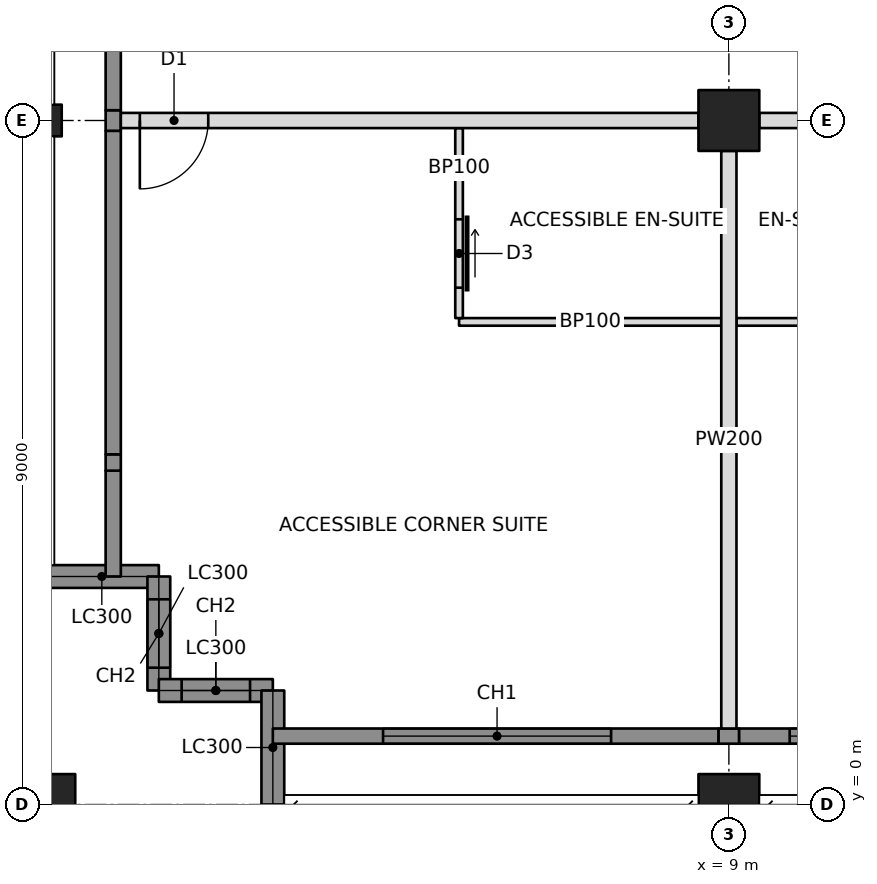
"""IFC4 building model, lengths in metres.
Left out: names, types, materials, properties, quantities, classifications, styles, units other than length and angle.
Written with IfcOpenShell. Run it as: python <this file> out.ifc"""

import sys

from ifc_helpers import new_model, si_unit, direction, frame, frame_2d, origin, origin_with_axes, origin_2d, place, context, subcontext, project, spatial, rectangle, hollow_rectangle, i_section, extrude, element, fill, save


model = new_model("IFC4")
c1 = context("Model", 3, precision=1e-05, world=origin(), true_north=direction((0.0, 1.0)))
c2 = subcontext(c1, "Body", "Model", "MODEL_VIEW")
j1 = project(units=[si_unit("LENGTHUNIT", "METRE"), si_unit("PLANEANGLEUNIT", "RADIAN")], contexts=[c1])
p1 = place(None, origin())
s1 = spatial("IfcSite", under=j1, at=p1, CompositionType="ELEMENT")
p2 = place(p1, origin())
s2 = spatial("IfcBuilding", under=s1, at=p2, CompositionType="ELEMENT")
p3 = place(p2, frame((0.0, 0.0, 259.0)))
s3 = spatial("IfcBuildingStorey", under=s2, at=p3, CompositionType="ELEMENT", Elevation=259.0)
p4 = place(p3, origin_with_axes())
e1 = element("IfcColumn", 1, at=p4, inside=s3, PredefinedType="COLUMN", context=c2, shape_type="SweptSolid", body=[
    extrude(hollow_rectangle(XDim=0.8, YDim=0.8, WallThickness=0.032, at=origin_2d()), origin(), (0.0, 0.0, 1.0), 3.6),
])
p5 = place(p3, frame((0.0, 9.0, 0.0), z_axis=(0.0, 0.0, 1.0), x_axis=(0.0, 1.0, 0.0)))
e2 = element("IfcColumn", 2, at=p5, inside=s3, PredefinedType="COLUMN", context=c2, shape_type="SweptSolid", body=[
    extrude(i_section(OverallWidth=0.417, OverallDepth=0.445, WebThickness=0.039, FlangeThickness=0.063, at=origin_2d()), origin(), (0.0, 0.0, 1.0), 3.6),
])
for number, where, z_axis, x_axis in (
    (3, (9.0, 0.0, 0.0), (0.0, 0.0, 1.0), (1.0, 0.0, 0.0)),
    (4, (9.0, 9.0, 0.0), (0.0, 0.0, 1.0), (1.0, 0.0, 0.0)),
):
    element("IfcColumn", number, at=place(p3, frame(where, z_axis=z_axis, x_axis=x_axis)), inside=s3, PredefinedType="COLUMN", context=c2, shape_type="SweptSolid", body=[
        extrude(hollow_rectangle(XDim=0.8, YDim=0.8, WallThickness=0.032, at=origin_2d()), origin(), (0.0, 0.0, 1.0), 3.6),
    ])
p6 = place(p3, frame((0.0, 3.0, 0.0), z_axis=(0.0, 0.0, 1.0), x_axis=(1.0, 0.0, 0.0)))
e5 = element("IfcWall", 5, at=p6, inside=s3, PredefinedType="SOLIDWALL", context=c2, shape_type="SweptSolid", body=[
    extrude(rectangle(XDim=1.5, YDim=0.3, at=frame_2d((0.75, 0.0))), origin(), (0.0, 0.0, 1.0), 2.62),
])
p7 = place(p3, frame((1.5, 3.0, 0.0), z_axis=(0.0, 0.0, 1.0), x_axis=(0.0, -1.0, 0.0)))
e6 = element("IfcWall", 6, at=p7, inside=s3, PredefinedType="SOLIDWALL", context=c2, shape_type="SweptSolid", body=[
    extrude(rectangle(XDim=1.5, YDim=0.3, at=frame_2d((0.75, 0.0))), origin(), (0.0, 0.0, 1.0), 3.4),
])
p8 = place(p7, frame((0.3, 0.0, 0.6)))
e7 = element("IfcOpeningElement", 7, at=p8, cuts=e6, PredefinedType="OPENING", context=c2, shape_type="SweptSolid", body=[
    extrude(rectangle(XDim=0.9, YDim=2.2, at=frame_2d((0.45, 1.1))), frame((0.0, 0.16, 0.0), z_axis=(0.0, -1.0, 0.0), x_axis=(1.0, 0.0, 0.0)), (0.0, 0.0, 1.0), 0.32),
])
p9 = place(p3, frame((1.5, 1.5, 0.0), z_axis=(0.0, 0.0, 1.0), x_axis=(1.0, 0.0, 0.0)))
e8 = element("IfcWall", 8, at=p9, inside=s3, PredefinedType="SOLIDWALL", context=c2, shape_type="SweptSolid", body=[
    extrude(rectangle(XDim=1.5, YDim=0.3, at=frame_2d((0.75, 0.0))), origin(), (0.0, 0.0, 1.0), 3.4),
])
p10 = place(p9, frame((0.3, 0.0, 0.6)))
e9 = element("IfcOpeningElement", 9, at=p10, cuts=e8, PredefinedType="OPENING", context=c2, shape_type="SweptSolid", body=[
    extrude(rectangle(XDim=0.9, YDim=2.2, at=frame_2d((0.45, 1.1))), frame((0.0, 0.16, 0.0), z_axis=(0.0, -1.0, 0.0), x_axis=(1.0, 0.0, 0.0)), (0.0, 0.0, 1.0), 0.32),
])
p11 = place(p3, frame((3.0, 1.5, 0.0), z_axis=(0.0, 0.0, 1.0), x_axis=(0.0, -1.0, 0.0)))
e10 = element("IfcWall", 10, at=p11, inside=s3, PredefinedType="SOLIDWALL", context=c2, shape_type="SweptSolid", body=[
    extrude(rectangle(XDim=1.5, YDim=0.3, at=frame_2d((0.75, 0.0))), origin(), (0.0, 0.0, 1.0), 2.62),
])
p12 = place(p3, frame((3.0, 0.9, 0.0), z_axis=(0.0, 0.0, 1.0), x_axis=(1.0, 0.0, 0.0)))
e11 = element("IfcWall", 11, at=p12, inside=s3, PredefinedType="SOLIDWALL", context=c2, shape_type="SweptSolid", body=[
    extrude(rectangle(XDim=5.865, YDim=0.2, at=frame_2d((2.932, 0.0))), origin(), (0.0, 0.0, 1.0), 3.4),
])
p13 = place(p12, frame((1.45, 0.0, 0.6)))
e12 = element("IfcOpeningElement", 12, at=p13, cuts=e11, PredefinedType="OPENING", context=c2, shape_type="SweptSolid", body=[
    extrude(rectangle(XDim=3.0, YDim=2.2, at=frame_2d((1.5, 1.1))), frame((0.0, 0.11, 0.0), z_axis=(0.0, -1.0, 0.0), x_axis=(1.0, 0.0, 0.0)), (0.0, 0.0, 1.0), 0.22),
])
p14 = place(p3, frame((0.9, 3.0, 0.0), z_axis=(0.0, 0.0, 1.0), x_axis=(0.0, 1.0, 0.0)))
e13 = element("IfcWall", 13, at=p14, inside=s3, PredefinedType="SOLIDWALL", context=c2, shape_type="SweptSolid", body=[
    extrude(rectangle(XDim=1.393, YDim=0.2, at=frame_2d((0.696, 0.0))), origin(), (0.0, 0.0, 1.0), 3.4),
])
p15 = place(p3, frame((1.0, 9.0, 0.0), z_axis=(0.0, 0.0, 1.0), x_axis=(1.0, 0.0, 0.0)))
e14 = element("IfcWall", 14, at=p15, inside=s3, PredefinedType="PARTITIONING", context=c2, shape_type="SweptSolid", body=[
    extrude(rectangle(XDim=7.6, YDim=0.2, at=frame_2d((3.8, 0.0))), origin(), (0.0, 0.0, 1.0), 2.638),
])
p16 = place(p15, frame((0.25, 0.0, 0.0)))
e15 = element("IfcOpeningElement", 15, at=p16, cuts=e14, PredefinedType="OPENING", context=c2, shape_type="SweptSolid", body=[
    extrude(rectangle(XDim=0.9, YDim=2.1, at=frame_2d((0.45, 1.05))), frame((0.0, 0.11, 0.0), z_axis=(0.0, -1.0, 0.0), x_axis=(1.0, 0.0, 0.0)), (0.0, 0.0, 1.0), 0.22),
])
p17 = place(p3, frame((9.4, 9.0, 0.0), z_axis=(0.0, 0.0, 1.0), x_axis=(1.0, 0.0, 0.0)))
e16 = element("IfcWall", 16, at=p17, inside=s3, PredefinedType="PARTITIONING", context=c2, shape_type="SweptSolid", body=[
    extrude(rectangle(XDim=8.2, YDim=0.2, at=frame_2d((4.1, 0.0))), origin(), (0.0, 0.0, 1.0), 2.605),
])
p18 = place(p17, frame((2.95, 0.0, 0.0)))
e17 = element("IfcOpeningElement", 17, at=p18, cuts=e16, PredefinedType="OPENING", context=c2, shape_type="SweptSolid", body=[
    extrude(rectangle(XDim=0.9, YDim=2.1, at=frame_2d((0.45, 1.05))), frame((0.0, 0.11, 0.0), z_axis=(0.0, -1.0, 0.0), x_axis=(1.0, 0.0, 0.0)), (0.0, 0.0, 1.0), 0.22),
])
p19 = place(p17, frame((4.35, 0.0, 0.0)))
e18 = element("IfcOpeningElement", 18, at=p19, cuts=e16, PredefinedType="OPENING", context=c2, shape_type="SweptSolid", body=[
    extrude(rectangle(XDim=0.9, YDim=2.1, at=frame_2d((0.45, 1.05))), frame((0.0, 0.11, 0.0), z_axis=(0.0, -1.0, 0.0), x_axis=(1.0, 0.0, 0.0)), (0.0, 0.0, 1.0), 0.22),
])
p20 = place(p3, frame((9.0, 8.6, 0.0), z_axis=(0.0, 0.0, 1.0), x_axis=(0.0, -1.0, 0.0)))
e19 = element("IfcWall", 19, at=p20, inside=s3, PredefinedType="PARTITIONING", context=c2, shape_type="SweptSolid", body=[
    extrude(rectangle(XDim=7.6, YDim=0.2, at=frame_2d((3.8, 0.0))), origin(), (0.0, 0.0, 1.0), 2.638),
])
p21 = place(p3, frame((5.45, 6.35, 0.0), z_axis=(0.0, 0.0, 1.0), x_axis=(1.0, 0.0, 0.0)))
e20 = element("IfcWall", 20, at=p21, inside=s3, PredefinedType="PARTITIONING", context=c2, shape_type="SweptSolid", body=[
    extrude(rectangle(XDim=3.45, YDim=0.1, at=frame_2d((1.725, 0.0))), origin(), (0.0, 0.0, 1.0), 2.638),
])
p22 = place(p3, frame((5.45, 8.9, 0.0), z_axis=(0.0, 0.0, 1.0), x_axis=(0.0, -1.0, 0.0)))
e21 = element("IfcWall", 21, at=p22, inside=s3, PredefinedType="PARTITIONING", context=c2, shape_type="SweptSolid", body=[
    extrude(rectangle(XDim=2.5, YDim=0.1, at=frame_2d((1.25, 0.0))), origin(), (0.0, 0.0, 1.0), 2.638),
])
p23 = place(p22, frame((1.2, 0.0, 0.0)))
e22 = element("IfcOpeningElement", 22, at=p23, cuts=e21, PredefinedType="OPENING", context=c2, shape_type="SweptSolid", body=[
    extrude(rectangle(XDim=0.9, YDim=2.1, at=frame_2d((0.45, 1.05))), frame((0.0, 0.06, 0.0), z_axis=(0.0, -1.0, 0.0), x_axis=(1.0, 0.0, 0.0)), (0.0, 0.0, 1.0), 0.12),
])
p24 = place(p3, frame((9.1, 6.35, 0.0), z_axis=(0.0, 0.0, 1.0), x_axis=(1.0, 0.0, 0.0)))
e23 = element("IfcWall", 23, at=p24, inside=s3, PredefinedType="PARTITIONING", context=c2, shape_type="SweptSolid", body=[
    extrude(rectangle(XDim=2.95, YDim=0.1, at=frame_2d((1.475, 0.0))), origin(), (0.0, 0.0, 1.0), 2.638),
])
p25 = place(p3, frame((8.865, 0.9, 0.0), z_axis=(0.0, 0.0, 1.0), x_axis=(1.0, 0.0, 0.0)))
e24 = element("IfcWall", 24, at=p25, inside=s3, PredefinedType="SOLIDWALL", context=c2, shape_type="SweptSolid", body=[
    extrude(rectangle(XDim=0.271, YDim=0.2, at=frame_2d((0.135, 0.0))), origin(), (0.0, 0.0, 1.0), 2.638),
])
p26 = place(p3, frame((9.135, 0.9, 0.0), z_axis=(0.0, 0.0, 1.0), x_axis=(1.0, 0.0, 0.0)))
e25 = element("IfcWall", 25, at=p26, inside=s3, PredefinedType="SOLIDWALL", context=c2, shape_type="SweptSolid", body=[
    extrude(rectangle(XDim=8.671, YDim=0.2, at=frame_2d((4.335, 0.0))), origin(), (0.0, 0.0, 1.0), 3.4),
])
p27 = place(p26, frame((0.665, 0.0, 0.6)))
e26 = element("IfcOpeningElement", 26, at=p27, cuts=e25, PredefinedType="OPENING", context=c2, shape_type="SweptSolid", body=[
    extrude(rectangle(XDim=3.0, YDim=2.2, at=frame_2d((1.5, 1.1))), frame((0.0, 0.11, 0.0), z_axis=(0.0, -1.0, 0.0), x_axis=(1.0, 0.0, 0.0)), (0.0, 0.0, 1.0), 0.22),
])
p28 = place(p26, frame((5.065, 0.0, 0.6)))
e27 = element("IfcOpeningElement", 27, at=p28, cuts=e25, PredefinedType="OPENING", context=c2, shape_type="SweptSolid", body=[
    extrude(rectangle(XDim=3.0, YDim=2.2, at=frame_2d((1.5, 1.1))), frame((0.0, 0.11, 0.0), z_axis=(0.0, -1.0, 0.0), x_axis=(1.0, 0.0, 0.0)), (0.0, 0.0, 1.0), 0.22),
])
p29 = place(p3, frame((0.9, 4.393, 0.0), z_axis=(0.0, 0.0, 1.0), x_axis=(0.0, 1.0, 0.0)))
e28 = element("IfcWall", 28, at=p29, inside=s3, PredefinedType="SOLIDWALL", context=c2, shape_type="SweptSolid", body=[
    extrude(rectangle(XDim=0.215, YDim=0.2, at=frame_2d((0.107, 0.0))), origin(), (0.0, 0.0, 1.0), 2.861),
])
p30 = place(p3, frame((0.9, 4.607, 0.0), z_axis=(0.0, 0.0, 1.0), x_axis=(0.0, 1.0, 0.0)))
e29 = element("IfcWall", 29, at=p30, inside=s3, PredefinedType="SOLIDWALL", context=c2, shape_type="SweptSolid", body=[
    extrude(rectangle(XDim=4.257, YDim=0.2, at=frame_2d((2.129, 0.0))), origin(), (0.0, 0.0, 1.0), 3.4),
])
p31 = place(p3, frame((0.9, 8.865, 0.0), z_axis=(0.0, 0.0, 1.0), x_axis=(0.0, 1.0, 0.0)))
e30 = element("IfcWall", 30, at=p31, inside=s3, PredefinedType="SOLIDWALL", context=c2, shape_type="SweptSolid", body=[
    extrude(rectangle(XDim=0.271, YDim=0.2, at=frame_2d((0.135, 0.0))), origin(), (0.0, 0.0, 1.0), 2.638),
])
p32 = place(p3, frame((0.9, 9.135, 0.0), z_axis=(0.0, 0.0, 1.0), x_axis=(0.0, 1.0, 0.0)))
e31 = element("IfcWall", 31, at=p32, inside=s3, PredefinedType="SOLIDWALL", context=c2, shape_type="SweptSolid", body=[
    extrude(rectangle(XDim=8.671, YDim=0.2, at=frame_2d((4.335, 0.0))), origin(), (0.0, 0.0, 1.0), 3.4),
])
p33 = place(p32, frame((2.015, 0.0, 0.6)))
e32 = element("IfcOpeningElement", 32, at=p33, cuts=e31, PredefinedType="OPENING", context=c2, shape_type="SweptSolid", body=[
    extrude(rectangle(XDim=3.0, YDim=2.2, at=frame_2d((1.5, 1.1))), frame((0.0, 0.11, 0.0), z_axis=(0.0, -1.0, 0.0), x_axis=(1.0, 0.0, 0.0)), (0.0, 0.0, 1.0), 0.22),
])
p34 = place(p32, frame((5.515, 0.0, 0.6)))
e33 = element("IfcOpeningElement", 33, at=p34, cuts=e31, PredefinedType="OPENING", context=c2, shape_type="SweptSolid", body=[
    extrude(rectangle(XDim=3.0, YDim=2.2, at=frame_2d((1.5, 1.1))), frame((0.0, 0.11, 0.0), z_axis=(0.0, -1.0, 0.0), x_axis=(1.0, 0.0, 0.0)), (0.0, 0.0, 1.0), 0.22),
])
p35 = place(p8, origin())
e34 = element("IfcWindow", 34, at=p35, inside=s3, PartitioningType="SINGLE_PANEL", PredefinedType="WINDOW", context=c2, shape_type="SweptSolid", body=[
    extrude(rectangle(XDim=0.9, YDim=2.2, at=frame_2d((0.45, 1.1))), frame((0.0, 0.03, 0.0), z_axis=(0.0, -1.0, 0.0), x_axis=(1.0, 0.0, 0.0)), (0.0, 0.0, 1.0), 0.06),
])
fill(e7, e34)
p36 = place(p10, origin())
e35 = element("IfcWindow", 35, at=p36, inside=s3, PartitioningType="SINGLE_PANEL", PredefinedType="WINDOW", context=c2, shape_type="SweptSolid", body=[
    extrude(rectangle(XDim=0.9, YDim=2.2, at=frame_2d((0.45, 1.1))), frame((0.0, 0.03, 0.0), z_axis=(0.0, -1.0, 0.0), x_axis=(1.0, 0.0, 0.0)), (0.0, 0.0, 1.0), 0.06),
])
fill(e9, e35)
p37 = place(p13, origin())
e36 = element("IfcWindow", 36, at=p37, inside=s3, PartitioningType="TRIPLE_PANEL_VERTICAL", PredefinedType="WINDOW", context=c2, shape_type="SweptSolid", body=[
    extrude(rectangle(XDim=3.0, YDim=2.2, at=frame_2d((1.5, 1.1))), frame((0.0, 0.03, 0.0), z_axis=(0.0, -1.0, 0.0), x_axis=(1.0, 0.0, 0.0)), (0.0, 0.0, 1.0), 0.06),
])
fill(e12, e36)
p38 = place(p27, origin())
e37 = element("IfcWindow", 37, at=p38, inside=s3, PartitioningType="TRIPLE_PANEL_VERTICAL", PredefinedType="WINDOW", context=c2, shape_type="SweptSolid", body=[
    extrude(rectangle(XDim=3.0, YDim=2.2, at=frame_2d((1.5, 1.1))), frame((0.0, 0.03, 0.0), z_axis=(0.0, -1.0, 0.0), x_axis=(1.0, 0.0, 0.0)), (0.0, 0.0, 1.0), 0.06),
])
fill(e26, e37)
p39 = place(p23, origin())
e38 = element("IfcDoor", 38, at=p39, inside=s3, OperationType="SLIDING_TO_LEFT", PredefinedType="DOOR", context=c2, shape_type="SweptSolid", body=[
    extrude(rectangle(XDim=0.9, YDim=2.1, at=frame_2d((0.45, 1.05))), frame((0.0, 0.025, 0.0), z_axis=(0.0, -1.0, 0.0), x_axis=(1.0, 0.0, 0.0)), (0.0, 0.0, 1.0), 0.05),
])
fill(e22, e38)
p40 = place(p16, frame((0.9, 0.0, 0.0), z_axis=(0.0, 0.0, 1.0), x_axis=(-1.0, 0.0, 0.0)))
e39 = element("IfcDoor", 39, at=p40, inside=s3, OperationType="SINGLE_SWING_RIGHT", PredefinedType="DOOR", context=c2, shape_type="SweptSolid", body=[
    extrude(rectangle(XDim=0.9, YDim=2.1, at=frame_2d((0.45, 1.05))), frame((0.0, 0.025, 0.0), z_axis=(0.0, -1.0, 0.0), x_axis=(1.0, 0.0, 0.0)), (0.0, 0.0, 1.0), 0.05),
])
fill(e15, e39)
save(model, sys.argv[1])
